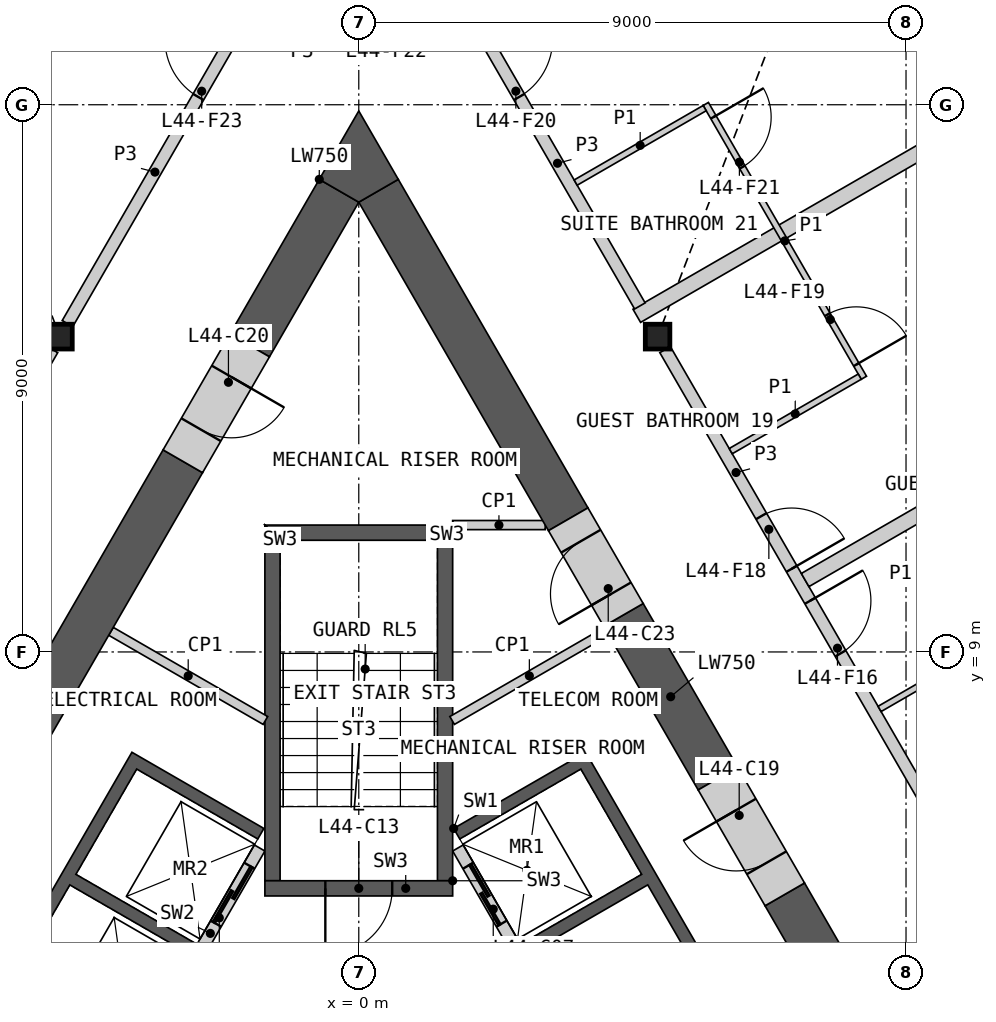
"""IFC4 building model, lengths in metres.
Left out: names, types, materials, properties, quantities, classifications, styles, units other than length and angle.
Written with IfcOpenShell. Run it as: python <this file> out.ifc"""

import sys

from ifc_helpers import new_model, si_unit, direction, frame, frame_2d, origin, origin_2d, place, context, subcontext, project, spatial, polyline, rectangle, i_section, outline, extrude, element, fill, save


model = new_model("IFC4")
c1 = context("Model", 3, precision=1e-05, world=origin(), true_north=direction((0.0, 1.0)))
c2 = subcontext(c1, "Body", "Model", "MODEL_VIEW")
j1 = project(units=[si_unit("LENGTHUNIT", "METRE"), si_unit("PLANEANGLEUNIT", "RADIAN")], contexts=[c1])
p1 = place(None, origin())
s1 = spatial("IfcSite", under=j1, at=p1, CompositionType="ELEMENT")
p2 = place(p1, origin())
s2 = spatial("IfcBuilding", under=s1, at=p2, CompositionType="ELEMENT")
p3 = place(p2, frame((0.0, 0.0, 201.6)))
s3 = spatial("IfcBuildingStorey", under=s2, at=p3, CompositionType="ELEMENT", Elevation=201.6)
for number, where, z_axis, x_axis in (
    (1, (-4.914, 14.186, 0.0), (0.0, 0.0, 1.0), (1.0, 0.0, 0.0)),
    (2, (4.914, 14.186, 0.0), (0.0, 0.0, 1.0), (1.0, 0.0, 0.0)),
):
    element("IfcColumn", number, at=place(p3, frame(where, z_axis=z_axis, x_axis=x_axis)), inside=s3, PredefinedType="COLUMN", context=c2, shape_type="SweptSolid", body=[
        extrude(i_section(OverallWidth=0.404, OverallDepth=0.407, WebThickness=0.027, FlangeThickness=0.044, at=origin_2d()), origin(), (0.0, 0.0, 1.0), 3.6),
    ])
p4 = place(p3, origin())
e3 = element("IfcWall", 3, at=p4, inside=s3, PredefinedType="SHEAR", context=c2, shape_type="SweptSolid", body=[
    extrude(outline(polyline([(1.561, 6.097), (3.731, 7.35), (7.131, 1.461), (4.96, 0.208), (4.861, 0.381), (6.852, 1.531), (4.752, 5.169), (2.76, 4.019), (2.66, 4.192), (4.652, 5.342), (3.652, 7.074), (1.66, 5.924), (1.561, 6.097)])), origin(), (0.0, 0.0, 1.0), 3.25),
])
p5 = place(p3, frame((5.817, -1.476, 0.0), z_axis=(0.0, 0.0, 1.0), x_axis=(-0.500002616675, 0.866023893041, 0.0)))
e4 = element("IfcWall", 4, at=p5, inside=s3, PredefinedType="SOLIDWALL", context=c2, shape_type="SweptSolid", body=[
    extrude(rectangle(XDim=8.373, YDim=0.2, at=frame_2d((4.187, 0.0))), origin(), (0.0, 0.0, 1.0), 3.25),
])
p6 = place(p5, frame((0.437, 0.0, 0.0)))
e5 = element("IfcOpeningElement", 5, at=p6, cuts=e4, PredefinedType="OPENING", context=c2, shape_type="SweptSolid", body=[
    extrude(rectangle(XDim=0.9, YDim=2.1, at=frame_2d((0.45, 1.05))), frame((0.0, 0.11, 0.0), z_axis=(0.0, -1.0, 0.0), x_axis=(1.0, 0.0, 0.0)), (0.0, 0.0, 1.0), 0.22),
])
p7 = place(p5, frame((3.737, 0.0, 0.0)))
e6 = element("IfcOpeningElement", 6, at=p7, cuts=e4, PredefinedType="OPENING", context=c2, shape_type="SweptSolid", body=[
    extrude(rectangle(XDim=0.9, YDim=2.1, at=frame_2d((0.45, 1.05))), frame((0.0, 0.11, 0.0), z_axis=(0.0, -1.0, 0.0), x_axis=(1.0, 0.0, 0.0)), (0.0, 0.0, 1.0), 0.22),
])
p8 = place(p5, frame((6.937, 0.0, 0.0)))
e7 = element("IfcOpeningElement", 7, at=p8, cuts=e4, PredefinedType="OPENING", context=c2, shape_type="SweptSolid", body=[
    extrude(rectangle(XDim=1.1, YDim=2.1, at=frame_2d((0.55, 1.05))), frame((0.0, 0.11, 0.0), z_axis=(0.0, -1.0, 0.0), x_axis=(1.0, 0.0, 0.0)), (0.0, 0.0, 1.0), 0.22),
])
p9 = place(p3, origin())
e8 = element("IfcWall", 8, at=p9, inside=s3, PredefinedType="SHEAR", context=c2, shape_type="SweptSolid", body=[
    extrude(outline(polyline([(-4.96, 0.208), (-7.131, 1.461), (-3.731, 7.35), (-1.561, 6.097), (-1.66, 5.924), (-3.652, 7.074), (-4.652, 5.342), (-2.66, 4.192), (-2.76, 4.019), (-4.752, 5.169), (-5.752, 3.437), (-3.76, 2.287), (-3.861, 2.113), (-5.852, 3.263), (-6.852, 1.531), (-4.861, 0.381), (-4.96, 0.208)])), origin(), (0.0, 0.0, 1.0), 3.25),
])
p10 = place(p3, frame((-1.631, 5.776, 0.0), z_axis=(0.0, 0.0, 1.0), x_axis=(-0.499992876559, -0.866029516466, 0.0)))
e9 = element("IfcWall", 9, at=p10, inside=s3, PredefinedType="SOLIDWALL", context=c2, shape_type="SweptSolid", body=[
    extrude(rectangle(XDim=6.486, YDim=0.2, at=frame_2d((3.243, 0.0))), origin(), (0.0, 0.0, 1.0), 3.25),
])
p11 = place(p10, frame((0.337, 0.0, 0.0)))
e10 = element("IfcOpeningElement", 10, at=p11, cuts=e9, PredefinedType="OPENING", context=c2, shape_type="SweptSolid", body=[
    extrude(rectangle(XDim=1.1, YDim=2.1, at=frame_2d((0.55, 1.05))), frame((0.0, 0.11, 0.0), z_axis=(0.0, -1.0, 0.0), x_axis=(1.0, 0.0, 0.0)), (0.0, 0.0, 1.0), 0.22),
])
p12 = place(p10, frame((2.537, 0.0, 0.0)))
e11 = element("IfcOpeningElement", 11, at=p12, cuts=e9, PredefinedType="OPENING", context=c2, shape_type="SweptSolid", body=[
    extrude(rectangle(XDim=1.1, YDim=2.1, at=frame_2d((0.55, 1.05))), frame((0.0, 0.11, 0.0), z_axis=(0.0, -1.0, 0.0), x_axis=(1.0, 0.0, 0.0)), (0.0, 0.0, 1.0), 0.22),
])
p13 = place(p3, origin())
e12 = element("IfcWall", 12, at=p13, inside=s3, PredefinedType="SHEAR", context=c2, shape_type="SweptSolid", body=[
    extrude(outline(polyline([(1.544, 5.237), (1.544, 11.087), (1.294, 10.837), (1.294, 5.237), (1.544, 5.237)])), origin(), (0.0, 0.0, 1.0), 3.25),
])
p14 = place(p3, origin())
e13 = element("IfcWall", 13, at=p14, inside=s3, PredefinedType="SHEAR", context=c2, shape_type="SweptSolid", body=[
    extrude(outline(polyline([(1.544, 11.087), (-1.544, 11.087), (-1.294, 10.837), (1.294, 10.837), (1.544, 11.087)])), origin(), (0.0, 0.0, 1.0), 3.25),
])
p15 = place(p3, origin())
e14 = element("IfcWall", 14, at=p15, inside=s3, PredefinedType="SHEAR", context=c2, shape_type="SweptSolid", body=[
    extrude(outline(polyline([(-1.294, 10.837), (-1.544, 11.087), (-1.544, 5.237), (-1.294, 5.237), (-1.294, 10.837)])), origin(), (0.0, 0.0, 1.0), 3.25),
])
p16 = place(p3, frame((1.544, 5.112, 0.0), z_axis=(0.0, 0.0, 1.0), x_axis=(-1.0, 0.0, 0.0)))
e15 = element("IfcWall", 15, at=p16, inside=s3, PredefinedType="SHEAR", context=c2, shape_type="SweptSolid", body=[
    extrude(rectangle(XDim=3.088, YDim=0.25, at=frame_2d((1.544, 0.0))), origin(), (0.0, 0.0, 1.0), 3.25),
])
p17 = place(p16, frame((0.994, 0.0, 0.0)))
e16 = element("IfcOpeningElement", 16, at=p17, cuts=e15, PredefinedType="OPENING", context=c2, shape_type="SweptSolid", body=[
    extrude(rectangle(XDim=1.1, YDim=2.1, at=frame_2d((0.55, 1.05))), frame((0.0, 0.135, 0.0), z_axis=(0.0, -1.0, 0.0), x_axis=(1.0, 0.0, 0.0)), (0.0, 0.0, 1.0), 0.27),
])
for number, where, z_axis, x_axis in (
    (17, (-4.075, 9.339, 0.0), (0.0, 0.0, 1.0), (0.866, -0.5, 0.0)),
    (18, (4.075, 9.339, 0.0), (0.0, 0.0, 1.0), (-0.866, -0.5, 0.0)),
):
    element("IfcWall", number, at=place(p3, frame(where, z_axis=z_axis, x_axis=x_axis)), inside=s3, PredefinedType="PARTITIONING", context=c2, shape_type="SweptSolid", body=[
        extrude(rectangle(XDim=2.933, YDim=0.15, at=frame_2d((1.466, 0.0))), origin(), (0.0, 0.0, 1.0), 3.25),
    ])
p18 = place(p3, frame((1.544, 11.087, 0.0), z_axis=(0.0, 0.0, 1.0), x_axis=(1.0, 0.0, 0.0)))
e19 = element("IfcWall", 19, at=p18, inside=s3, PredefinedType="PARTITIONING", context=c2, shape_type="SweptSolid", body=[
    extrude(rectangle(XDim=1.522, YDim=0.15, at=frame_2d((0.761, 0.0))), origin(), (0.0, 0.0, 1.0), 3.25),
])
p19 = place(p3, frame((14.526, -8.011, 0.0), z_axis=(0.0, 0.0, 1.0), x_axis=(-0.499996012963, 0.866027705689, 0.0)))
e20 = element("IfcWall", 20, at=p19, inside=s3, PredefinedType="SHEAR", context=c2, shape_type="SweptSolid", body=[
    extrude(rectangle(XDim=15.039, YDim=0.75, at=frame_2d((7.519, 0.0))), origin(), (0.0, 0.0, 1.0), 3.25),
])
p20 = place(p3, frame((3.444, 11.182, 0.0), z_axis=(0.0, 0.0, 1.0), x_axis=(-0.499985517215, 0.866033765263, 0.0)))
e21 = element("IfcWall", 21, at=p20, inside=s3, PredefinedType="SHEAR", context=c2, shape_type="SweptSolid", body=[
    extrude(rectangle(XDim=6.24, YDim=0.75, at=frame_2d((3.12, 0.0))), origin(), (0.0, 0.0, 1.0), 3.25),
])
p21 = place(p3, frame((5.906, 6.918, 0.0), z_axis=(0.0, 0.0, 1.0), x_axis=(-0.500017123375, 0.866015517374, 0.0)))
e22 = element("IfcWall", 22, at=p21, inside=s3, PredefinedType="SHEAR", context=c2, shape_type="SweptSolid", body=[
    extrude(rectangle(XDim=3.108, YDim=0.75, at=frame_2d((1.554, 0.0))), origin(), (0.0, 0.0, 1.0), 3.25),
])
p22 = place(p3, frame((-2.894, 12.136, 0.0), z_axis=(0.0, 0.0, 1.0), x_axis=(-0.500021737671, -0.866012853171, 0.0)))
e23 = element("IfcWall", 23, at=p22, inside=s3, PredefinedType="SHEAR", context=c2, shape_type="SweptSolid", body=[
    extrude(rectangle(XDim=6.026, YDim=0.75, at=frame_2d((3.013, 0.0))), origin(), (0.0, 0.0, 1.0), 3.25),
])
p23 = place(p3, frame((-0.325, 16.585, 0.0), z_axis=(0.0, 0.0, 1.0), x_axis=(-0.500026977578, -0.866009827712, 0.0)))
e24 = element("IfcWall", 24, at=p23, inside=s3, PredefinedType="SHEAR", context=c2, shape_type="SweptSolid", body=[
    extrude(rectangle(XDim=2.938, YDim=0.75, at=frame_2d((1.469, 0.0))), origin(), (0.0, 0.0, 1.0), 3.25),
])
p24 = place(p3, origin())
e25 = element("IfcWall", 25, at=p24, inside=s3, PredefinedType="SHEAR", context=c2, shape_type="SweptSolid", body=[
    extrude(outline(polyline([(-0.649, 16.773), (0.0, 17.898), (0.649, 16.773), (0.0, 16.398), (-0.649, 16.773)])), origin(), (0.0, 0.0, 1.0), 3.25),
])
p25 = place(p3, frame((7.006, 5.012, 0.0), z_axis=(0.0, 0.0, 1.0), x_axis=(-0.499946605688, 0.86605622881, 0.0)))
e26 = element("IfcWall", 26, at=p25, inside=s3, PredefinedType="SHEAR", context=c2, shape_type="SweptSolid", body=[
    extrude(rectangle(XDim=2.2, YDim=0.75, at=frame_2d((1.1, 0.0))), origin(), (0.0, 0.0, 1.0), 3.25),
])
p26 = place(p25, frame((0.6, 0.0, 0.0)))
e27 = element("IfcOpeningElement", 27, at=p26, cuts=e26, PredefinedType="OPENING", context=c2, shape_type="SweptSolid", body=[
    extrude(rectangle(XDim=1.0, YDim=2.1, at=frame_2d((0.5, 1.05))), frame((0.0, 0.385, 0.0), z_axis=(0.0, -1.0, 0.0), x_axis=(1.0, 0.0, 0.0)), (0.0, 0.0, 1.0), 0.77),
])
p27 = place(p3, frame((-1.794, 14.041, 0.0), z_axis=(0.0, 0.0, 1.0), x_axis=(-0.499946605688, -0.86605622881, 0.0)))
e28 = element("IfcWall", 28, at=p27, inside=s3, PredefinedType="SHEAR", context=c2, shape_type="SweptSolid", body=[
    extrude(rectangle(XDim=2.2, YDim=0.75, at=frame_2d((1.1, 0.0))), origin(), (0.0, 0.0, 1.0), 3.25),
])
p28 = place(p27, frame((0.6, 0.0, 0.0)))
e29 = element("IfcOpeningElement", 29, at=p28, cuts=e28, PredefinedType="OPENING", context=c2, shape_type="SweptSolid", body=[
    extrude(rectangle(XDim=1.0, YDim=2.1, at=frame_2d((0.5, 1.05))), frame((0.0, 0.385, 0.0), z_axis=(0.0, -1.0, 0.0), x_axis=(1.0, 0.0, 0.0)), (0.0, 0.0, 1.0), 0.77),
])
p29 = place(p3, frame((4.353, 9.609, 0.0), z_axis=(0.0, 0.0, 1.0), x_axis=(-0.500071537347, 0.865984097738, 0.0)))
e30 = element("IfcWall", 30, at=p29, inside=s3, PredefinedType="SHEAR", context=c2, shape_type="SweptSolid", body=[
    extrude(rectangle(XDim=1.816, YDim=0.75, at=frame_2d((0.908, 0.0))), origin(), (0.0, 0.0, 1.0), 3.25),
])
p30 = place(p29, frame((0.4, 0.0, 0.0)))
e31 = element("IfcOpeningElement", 31, at=p30, cuts=e30, PredefinedType="OPENING", context=c2, shape_type="SweptSolid", body=[
    extrude(rectangle(XDim=1.0, YDim=2.1, at=frame_2d((0.5, 1.05))), frame((0.0, 0.385, 0.0), z_axis=(0.0, -1.0, 0.0), x_axis=(1.0, 0.0, 0.0)), (0.0, 0.0, 1.0), 0.77),
])
p31 = place(p3, frame((4.572, 14.529, 0.0), z_axis=(0.0, 0.0, 1.0), x_axis=(0.866023333059, 0.500003586584, 0.0)))
e32 = element("IfcWall", 32, at=p31, inside=s3, PredefinedType="PARTITIONING", context=c2, shape_type="SweptSolid", body=[
    extrude(rectangle(XDim=13.005, YDim=0.25, at=frame_2d((6.502, 0.0))), origin(), (0.0, 0.0, 1.0), 2.404),
])
p32 = place(p3, frame((5.038, 13.972, 0.0), z_axis=(0.0, 0.0, 1.0), x_axis=(0.50000393355, -0.866023132736, 0.0)))
e33 = element("IfcWall", 33, at=p32, inside=s3, PredefinedType="PARTITIONING", context=c2, shape_type="SweptSolid", body=[
    extrude(rectangle(XDim=9.335, YDim=0.2, at=frame_2d((4.667, 0.0))), origin(), (0.0, 0.0, 1.0), 3.25),
])
p33 = place(p32, frame((4.77, 0.0, 0.0)))
e34 = element("IfcOpeningElement", 34, at=p33, cuts=e33, PredefinedType="OPENING", context=c2, shape_type="SweptSolid", body=[
    extrude(rectangle(XDim=1.0, YDim=2.1, at=frame_2d((0.5, 1.05))), frame((0.0, 0.11, 0.0), z_axis=(0.0, -1.0, 0.0), x_axis=(1.0, 0.0, 0.0)), (0.0, 0.0, 1.0), 0.22),
])
p34 = place(p32, frame((3.163, 0.0, 0.0)))
e35 = element("IfcOpeningElement", 35, at=p34, cuts=e33, PredefinedType="OPENING", context=c2, shape_type="SweptSolid", body=[
    extrude(rectangle(XDim=1.0, YDim=2.1, at=frame_2d((0.5, 1.05))), frame((0.0, 0.11, 0.0), z_axis=(0.0, -1.0, 0.0), x_axis=(1.0, 0.0, 0.0)), (0.0, 0.0, 1.0), 0.22),
])
p35 = place(p3, frame((-9.705, 5.888, 0.0), z_axis=(0.0, 0.0, 1.0), x_axis=(0.50000393355, 0.866023132736, 0.0)))
e36 = element("IfcWall", 36, at=p35, inside=s3, PredefinedType="PARTITIONING", context=c2, shape_type="SweptSolid", body=[
    extrude(rectangle(XDim=9.335, YDim=0.2, at=frame_2d((4.667, 0.0))), origin(), (0.0, 0.0, 1.0), 3.25),
])
p36 = place(p35, frame((1.556, 0.0, 0.0)))
e37 = element("IfcOpeningElement", 37, at=p36, cuts=e36, PredefinedType="OPENING", context=c2, shape_type="SweptSolid", body=[
    extrude(rectangle(XDim=1.8, YDim=2.1, at=frame_2d((0.9, 1.05))), frame((0.0, 0.11, 0.0), z_axis=(0.0, -1.0, 0.0), x_axis=(1.0, 0.0, 0.0)), (0.0, 0.0, 1.0), 0.22),
])
p37 = place(p3, frame((7.341, 10.183, 0.0), z_axis=(0.0, 0.0, 1.0), x_axis=(0.866028741424, 0.499994218994, 0.0)))
e38 = element("IfcWall", 38, at=p37, inside=s3, PredefinedType="PARTITIONING", context=c2, shape_type="SweptSolid", body=[
    extrude(rectangle(XDim=8.139, YDim=0.25, at=frame_2d((4.07, 0.0))), origin(), (0.0, 0.0, 1.0), 2.404),
])
p38 = place(p3, frame((-4.791, 14.4, 0.0), z_axis=(0.0, 0.0, 1.0), x_axis=(0.50000762079, 0.866021003874, 0.0)))
e39 = element("IfcWall", 39, at=p38, inside=s3, PredefinedType="PARTITIONING", context=c2, shape_type="SweptSolid", body=[
    extrude(rectangle(XDim=5.756, YDim=0.2, at=frame_2d((2.878, 0.0))), origin(), (0.0, 0.0, 1.0), 3.25),
])
p39 = place(p38, frame((4.304, 0.0, 0.0)))
e40 = element("IfcOpeningElement", 40, at=p39, cuts=e39, PredefinedType="OPENING", context=c2, shape_type="SweptSolid", body=[
    extrude(rectangle(XDim=1.1, YDim=2.1, at=frame_2d((0.55, 1.05))), frame((0.0, 0.11, 0.0), z_axis=(0.0, -1.0, 0.0), x_axis=(1.0, 0.0, 0.0)), (0.0, 0.0, 1.0), 0.22),
])
p40 = place(p3, frame((1.913, 19.385, 0.0), z_axis=(0.0, 0.0, 1.0), x_axis=(0.499961611314, -0.866047566368, 0.0)))
e41 = element("IfcWall", 41, at=p40, inside=s3, PredefinedType="PARTITIONING", context=c2, shape_type="SweptSolid", body=[
    extrude(rectangle(XDim=5.42, YDim=0.2, at=frame_2d((2.71, 0.0))), origin(), (0.0, 0.0, 1.0), 3.25),
])
p41 = place(p40, frame((0.351, 0.0, 0.0)))
e42 = element("IfcOpeningElement", 42, at=p41, cuts=e41, PredefinedType="OPENING", context=c2, shape_type="SweptSolid", body=[
    extrude(rectangle(XDim=1.1, YDim=2.1, at=frame_2d((0.55, 1.05))), frame((0.0, 0.11, 0.0), z_axis=(0.0, -1.0, 0.0), x_axis=(1.0, 0.0, 0.0)), (0.0, 0.0, 1.0), 0.22),
])
p42 = place(p3, frame((5.707, 18.013, 0.0), z_axis=(0.0, 0.0, 1.0), x_axis=(0.500006934395, -0.866021400173, 0.0)))
e43 = element("IfcWall", 43, at=p42, inside=s3, PredefinedType="PARTITIONING", context=c2, shape_type="SweptSolid", body=[
    extrude(rectangle(XDim=5.2, YDim=0.1, at=frame_2d((2.6, 0.0))), origin(), (0.0, 0.0, 1.0), 2.404),
])
p43 = place(p42, frame((4.0, 0.0, 0.0)))
e44 = element("IfcOpeningElement", 44, at=p43, cuts=e43, PredefinedType="OPENING", context=c2, shape_type="SweptSolid", body=[
    extrude(rectangle(XDim=0.95, YDim=2.1, at=frame_2d((0.475, 1.05))), frame((0.0, 0.06, 0.0), z_axis=(0.0, -1.0, 0.0), x_axis=(1.0, 0.0, 0.0)), (0.0, 0.0, 1.0), 0.12),
])
p44 = place(p42, frame((0.25, 0.0, 0.0)))
e45 = element("IfcOpeningElement", 45, at=p44, cuts=e43, PredefinedType="OPENING", context=c2, shape_type="SweptSolid", body=[
    extrude(rectangle(XDim=0.95, YDim=2.1, at=frame_2d((0.475, 1.05))), frame((0.0, 0.06, 0.0), z_axis=(0.0, -1.0, 0.0), x_axis=(1.0, 0.0, 0.0)), (0.0, 0.0, 1.0), 0.12),
])
for number, where, z_axis, x_axis in (
    (46, (6.117, 12.303, 0.0), (0.0, 0.0, 1.0), (0.866, 0.5, 0.0)),
    (47, (3.567, 16.719, 0.0), (0.0, 0.0, 1.0), (0.866, 0.5, 0.0)),
):
    element("IfcWall", number, at=place(p3, frame(where, z_axis=z_axis, x_axis=x_axis)), inside=s3, PredefinedType="PARTITIONING", context=c2, shape_type="SweptSolid", body=[
        extrude(rectangle(XDim=2.45, YDim=0.1, at=frame_2d((1.225, 0.0))), origin(), (0.0, 0.0, 1.0), 2.404),
    ])
p45 = place(p3, frame((8.565, 8.063, 0.0), z_axis=(0.0, 0.0, 1.0), x_axis=(0.866032905446, 0.499987006516, 0.0)))
e48 = element("IfcWall", 48, at=p45, inside=s3, PredefinedType="PARTITIONING", context=c2, shape_type="SweptSolid", body=[
    extrude(rectangle(XDim=2.45, YDim=0.1, at=frame_2d((1.225, 0.0))), origin(), (0.0, 0.0, 1.0), 2.404),
])
p46 = place(p8, origin())
e49 = element("IfcDoor", 49, at=p46, inside=s3, OperationType="SLIDING_TO_LEFT", PredefinedType="DOOR", context=c2, shape_type="SweptSolid", body=[
    extrude(rectangle(XDim=1.1, YDim=2.1, at=frame_2d((0.55, 1.05))), frame((0.0, 0.025, 0.0), z_axis=(0.0, -1.0, 0.0), x_axis=(1.0, 0.0, 0.0)), (0.0, 0.0, 1.0), 0.05),
])
fill(e7, e49)
p47 = place(p11, origin())
e50 = element("IfcDoor", 50, at=p47, inside=s3, OperationType="SLIDING_TO_LEFT", PredefinedType="DOOR", context=c2, shape_type="SweptSolid", body=[
    extrude(rectangle(XDim=1.1, YDim=2.1, at=frame_2d((0.55, 1.05))), frame((0.0, 0.025, 0.0), z_axis=(0.0, -1.0, 0.0), x_axis=(1.0, 0.0, 0.0)), (0.0, 0.0, 1.0), 0.05),
])
fill(e10, e50)
p48 = place(p17, origin())
e51 = element("IfcDoor", 51, at=p48, inside=s3, OperationType="SINGLE_SWING_RIGHT", PredefinedType="DOOR", context=c2, shape_type="SweptSolid", body=[
    extrude(rectangle(XDim=1.1, YDim=2.1, at=frame_2d((0.55, 1.05))), frame((0.0, 0.025, 0.0), z_axis=(0.0, -1.0, 0.0), x_axis=(1.0, 0.0, 0.0)), (0.0, 0.0, 1.0), 0.05),
])
fill(e16, e51)
p49 = place(p26, origin())
e52 = element("IfcDoor", 52, at=p49, inside=s3, OperationType="SINGLE_SWING_RIGHT", PredefinedType="DOOR", context=c2, shape_type="SweptSolid", body=[
    extrude(rectangle(XDim=1.0, YDim=2.1, at=frame_2d((0.5, 1.05))), frame((0.0, 0.13, 0.0), z_axis=(0.0, -1.0, 0.0), x_axis=(1.0, 0.0, 0.0)), (0.0, 0.0, 1.0), 0.05),
])
fill(e27, e52)
p50 = place(p28, origin())
e53 = element("IfcDoor", 53, at=p50, inside=s3, OperationType="SINGLE_SWING_LEFT", PredefinedType="DOOR", context=c2, shape_type="SweptSolid", body=[
    extrude(rectangle(XDim=1.0, YDim=2.1, at=frame_2d((0.5, 1.05))), frame((0.0, 0.13, 0.0), z_axis=(0.0, -1.0, 0.0), x_axis=(1.0, 0.0, 0.0)), (0.0, 0.0, 1.0), 0.05),
])
fill(e29, e53)
p51 = place(p30, origin())
e54 = element("IfcDoor", 54, at=p51, inside=s3, OperationType="SINGLE_SWING_LEFT", PredefinedType="DOOR", context=c2, shape_type="SweptSolid", body=[
    extrude(rectangle(XDim=1.0, YDim=2.1, at=frame_2d((0.5, 1.05))), frame((0.0, 0.13, 0.0), z_axis=(0.0, -1.0, 0.0), x_axis=(1.0, 0.0, 0.0)), (0.0, 0.0, 1.0), 0.05),
])
fill(e31, e54)
p52 = place(p33, origin())
e55 = element("IfcDoor", 55, at=p52, inside=s3, OperationType="SINGLE_SWING_LEFT", PredefinedType="DOOR", context=c2, shape_type="SweptSolid", body=[
    extrude(rectangle(XDim=1.0, YDim=2.1, at=frame_2d((0.5, 1.05))), frame((0.0, 0.025, 0.0), z_axis=(0.0, -1.0, 0.0), x_axis=(1.0, 0.0, 0.0)), (0.0, 0.0, 1.0), 0.05),
])
fill(e34, e55)
p53 = place(p34, origin())
e56 = element("IfcDoor", 56, at=p53, inside=s3, OperationType="SINGLE_SWING_RIGHT", PredefinedType="DOOR", context=c2, shape_type="SweptSolid", body=[
    extrude(rectangle(XDim=1.0, YDim=2.1, at=frame_2d((0.5, 1.05))), frame((0.0, 0.025, 0.0), z_axis=(0.0, -1.0, 0.0), x_axis=(1.0, 0.0, 0.0)), (0.0, 0.0, 1.0), 0.05),
])
fill(e35, e56)
p54 = place(p43, origin())
e57 = element("IfcDoor", 57, at=p54, inside=s3, OperationType="SINGLE_SWING_RIGHT", PredefinedType="DOOR", context=c2, shape_type="SweptSolid", body=[
    extrude(rectangle(XDim=0.95, YDim=2.1, at=frame_2d((0.475, 1.05))), frame((0.0, 0.025, 0.0), z_axis=(0.0, -1.0, 0.0), x_axis=(1.0, 0.0, 0.0)), (0.0, 0.0, 1.0), 0.05),
])
fill(e44, e57)
p55 = place(p41, origin())
e58 = element("IfcDoor", 58, at=p55, inside=s3, OperationType="SINGLE_SWING_LEFT", PredefinedType="DOOR", context=c2, shape_type="SweptSolid", body=[
    extrude(rectangle(XDim=1.1, YDim=2.1, at=frame_2d((0.55, 1.05))), frame((0.0, 0.025, 0.0), z_axis=(0.0, -1.0, 0.0), x_axis=(1.0, 0.0, 0.0)), (0.0, 0.0, 1.0), 0.05),
])
fill(e42, e58)
p56 = place(p44, origin())
e59 = element("IfcDoor", 59, at=p56, inside=s3, OperationType="SINGLE_SWING_LEFT", PredefinedType="DOOR", context=c2, shape_type="SweptSolid", body=[
    extrude(rectangle(XDim=0.95, YDim=2.1, at=frame_2d((0.475, 1.05))), frame((0.0, 0.025, 0.0), z_axis=(0.0, -1.0, 0.0), x_axis=(1.0, 0.0, 0.0)), (0.0, 0.0, 1.0), 0.05),
])
fill(e45, e59)
p57 = place(p39, origin())
e60 = element("IfcDoor", 60, at=p57, inside=s3, OperationType="SINGLE_SWING_RIGHT", PredefinedType="DOOR", context=c2, shape_type="SweptSolid", body=[
    extrude(rectangle(XDim=1.1, YDim=2.1, at=frame_2d((0.55, 1.05))), frame((0.0, 0.025, 0.0), z_axis=(0.0, -1.0, 0.0), x_axis=(1.0, 0.0, 0.0)), (0.0, 0.0, 1.0), 0.05),
])
fill(e40, e60)
save(model, sys.argv[1])
